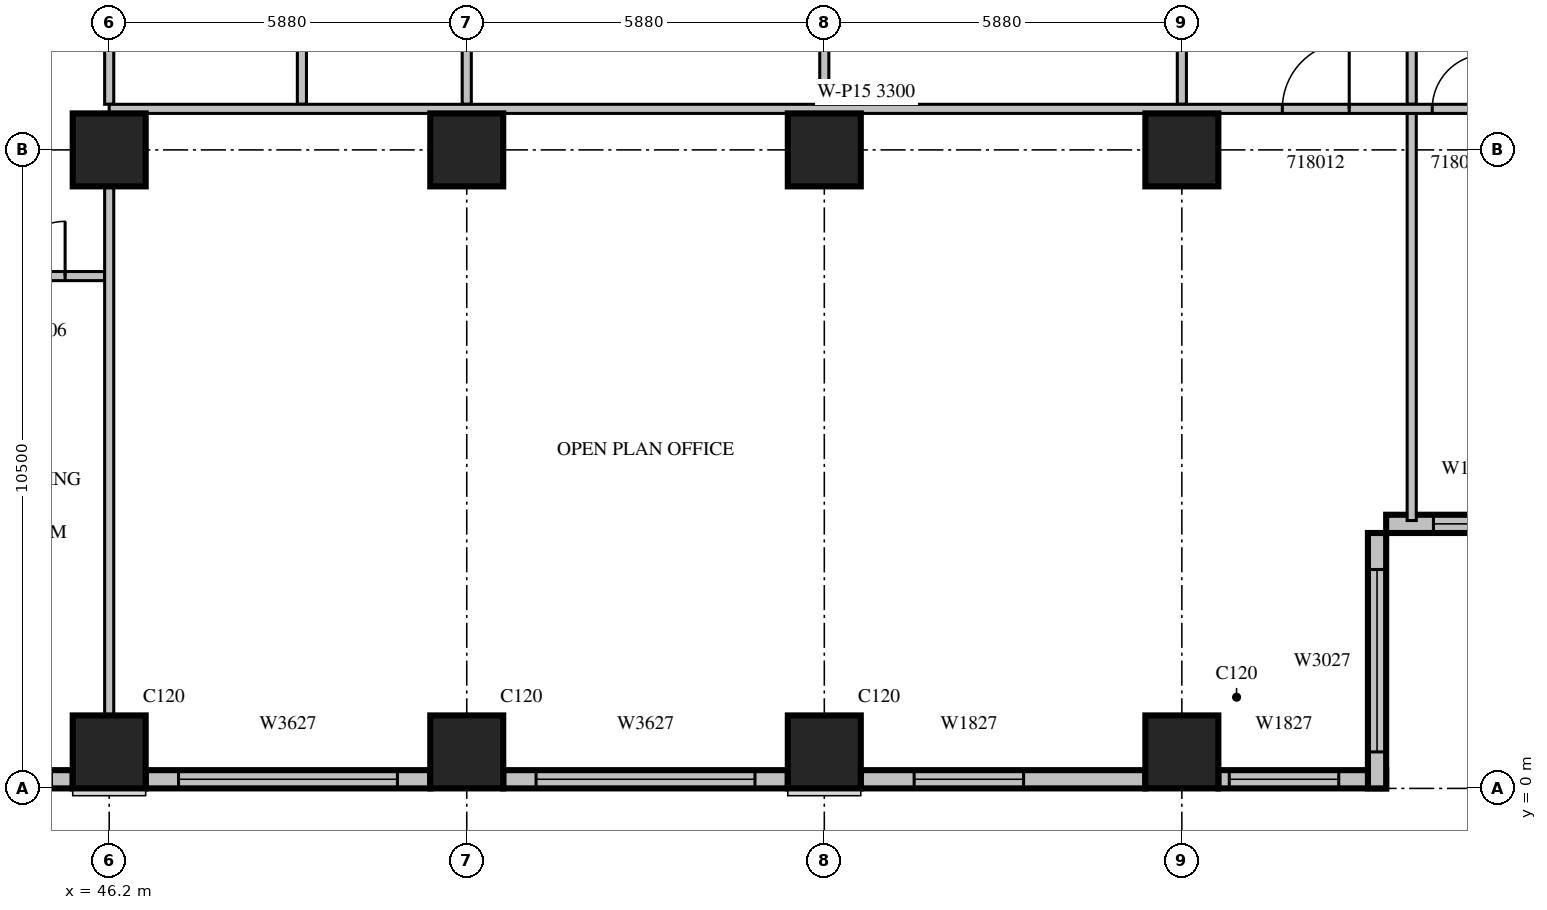
"""IFC4 building model, lengths in metres.
Left out: names, types, materials, properties, quantities, classifications, styles, units other than length and angle.
Written with IfcOpenShell. Run it as: python <this file> out.ifc"""

import sys

from ifc_helpers import new_model, si_unit, direction, frame, frame_2d, origin, origin_2d, place, context, subcontext, project, spatial, rectangle, extrude, source, transform, mapped, element, fill, save


model = new_model("IFC4")
c1 = context("Model", 3, precision=1e-05, world=origin(), true_north=direction((0.0, 1.0)))
c2 = subcontext(c1, "Body", "Model", "MODEL_VIEW")
j1 = project(units=[si_unit("LENGTHUNIT", "METRE"), si_unit("PLANEANGLEUNIT", "RADIAN")], contexts=[c1])
p1 = place(None, origin())
s1 = spatial("IfcSite", under=j1, at=p1, CompositionType="ELEMENT")
p2 = place(p1, origin())
s2 = spatial("IfcBuilding", under=s1, at=p2, CompositionType="ELEMENT")
p3 = place(p2, frame((0.0, 0.0, 86.7)))
s3 = spatial("IfcBuildingStorey", under=s2, at=p3, CompositionType="ELEMENT", Elevation=86.7)
m1 = source(origin(), c2, "Body", "SweptSolid", [
    extrude(rectangle(XDim=1.2, YDim=1.2, at=origin_2d()), origin(), (0.0, 0.0, 1.0), 4.2),
])
for number, where, z_axis, x_axis in (
    (1, (46.2, 0.6, 0.0), (0.0, 0.0, 1.0), (1.0, 0.0, 0.0)),
    (2, (52.08, 0.6, 0.0), (0.0, 0.0, 1.0), (1.0, 0.0, 0.0)),
    (3, (57.96, 0.6, 0.0), (0.0, 0.0, 1.0), (1.0, 0.0, 0.0)),
    (4, (63.84, 0.6, 0.0), (0.0, 0.0, 1.0), (1.0, 0.0, 0.0)),
    (5, (46.2, 10.5, 0.0), (0.0, 0.0, 1.0), (1.0, 0.0, 0.0)),
    (6, (52.08, 10.5, 0.0), (0.0, 0.0, 1.0), (1.0, 0.0, 0.0)),
    (7, (57.96, 10.5, 0.0), (0.0, 0.0, 1.0), (1.0, 0.0, 0.0)),
    (8, (63.84, 10.5, 0.0), (0.0, 0.0, 1.0), (1.0, 0.0, 0.0)),
):
    element("IfcColumn", number, at=place(p3, frame(where, z_axis=z_axis, x_axis=x_axis)), inside=s3, PredefinedType="COLUMN", context=c2, shape_type="MappedRepresentation", body=[
        mapped(m1, transform((0.0, 0.0, 0.0), scale=1.0)),
    ])
m2 = source(origin(), c2, "Body", "SweptSolid", [
    extrude(rectangle(XDim=1.6, YDim=0.3, at=frame_2d((0.8, 0.0))), origin(), (0.0, 0.0, 1.0), 3.8),
])
p4 = place(p3, frame((44.0, 0.15, 0.0), z_axis=(0.0, 0.0, 1.0), x_axis=(1.0, 0.0, 0.0)))
e9 = element("IfcWall", 9, at=p4, inside=s3, PredefinedType="STANDARD", context=c2, shape_type="MappedRepresentation", body=[
    mapped(m2, transform((0.0, 0.0, 0.0), scale=1.0)),
])
m3 = source(origin(), c2, "Body", "SweptSolid", [
    extrude(rectangle(XDim=0.9, YDim=2.7, at=frame_2d((0.45, 1.35))), frame((0.0, 0.16, 0.0), z_axis=(0.0, -1.0, 0.0), x_axis=(1.0, 0.0, 0.0)), (0.0, 0.0, 1.0), 0.32),
])
p5 = place(p4, frame((0.35, 0.0, 0.6)))
e10 = element("IfcOpeningElement", 10, at=p5, cuts=e9, PredefinedType="OPENING", context=c2, shape_type="MappedRepresentation", body=[
    mapped(m3, transform((0.0, 0.0, 0.0), scale=1.0)),
])
m4 = source(origin(), c2, "Body", "SweptSolid", [
    extrude(rectangle(XDim=4.68, YDim=0.3, at=frame_2d((2.34, 0.0))), origin(), (0.0, 0.0, 1.0), 3.8),
])
p6 = place(p3, frame((46.8, 0.15, 0.0), z_axis=(0.0, 0.0, 1.0), x_axis=(1.0, 0.0, 0.0)))
e11 = element("IfcWall", 11, at=p6, inside=s3, PredefinedType="STANDARD", context=c2, shape_type="MappedRepresentation", body=[
    mapped(m4, transform((0.0, 0.0, 0.0), scale=1.0)),
])
m5 = source(origin(), c2, "Body", "SweptSolid", [
    extrude(rectangle(XDim=3.6, YDim=2.7, at=frame_2d((1.8, 1.35))), frame((0.0, 0.16, 0.0), z_axis=(0.0, -1.0, 0.0), x_axis=(1.0, 0.0, 0.0)), (0.0, 0.0, 1.0), 0.32),
])
p7 = place(p6, frame((0.54, 0.0, 0.6)))
e12 = element("IfcOpeningElement", 12, at=p7, cuts=e11, PredefinedType="OPENING", context=c2, shape_type="MappedRepresentation", body=[
    mapped(m5, transform((0.0, 0.0, 0.0), scale=1.0)),
])
p8 = place(p3, frame((52.68, 0.15, 0.0), z_axis=(0.0, 0.0, 1.0), x_axis=(1.0, 0.0, 0.0)))
e13 = element("IfcWall", 13, at=p8, inside=s3, PredefinedType="STANDARD", context=c2, shape_type="MappedRepresentation", body=[
    mapped(m4, transform((0.0, 0.0, 0.0), scale=1.0)),
])
p9 = place(p8, frame((0.54, 0.0, 0.6)))
e14 = element("IfcOpeningElement", 14, at=p9, cuts=e13, PredefinedType="OPENING", context=c2, shape_type="MappedRepresentation", body=[
    mapped(m5, transform((0.0, 0.0, 0.0), scale=1.0)),
])
p10 = place(p3, frame((58.56, 0.15, 0.0), z_axis=(0.0, 0.0, 1.0), x_axis=(1.0, 0.0, 0.0)))
e15 = element("IfcWall", 15, at=p10, inside=s3, PredefinedType="STANDARD", context=c2, shape_type="MappedRepresentation", body=[
    mapped(m4, transform((0.0, 0.0, 0.0), scale=1.0)),
])
m6 = source(origin(), c2, "Body", "SweptSolid", [
    extrude(rectangle(XDim=1.8, YDim=2.7, at=frame_2d((0.9, 1.35))), frame((0.0, 0.16, 0.0), z_axis=(0.0, -1.0, 0.0), x_axis=(1.0, 0.0, 0.0)), (0.0, 0.0, 1.0), 0.32),
])
p11 = place(p10, frame((0.877, 0.0, 0.6)))
e16 = element("IfcOpeningElement", 16, at=p11, cuts=e15, PredefinedType="OPENING", context=c2, shape_type="MappedRepresentation", body=[
    mapped(m6, transform((0.0, 0.0, 0.0), scale=1.0)),
])
m7 = source(origin(), c2, "Body", "SweptSolid", [
    extrude(rectangle(XDim=2.76, YDim=0.3, at=frame_2d((1.38, 0.0))), origin(), (0.0, 0.0, 1.0), 3.8),
])
p12 = place(p3, frame((64.44, 0.15, 0.0), z_axis=(0.0, 0.0, 1.0), x_axis=(1.0, 0.0, 0.0)))
e17 = element("IfcWall", 17, at=p12, inside=s3, PredefinedType="STANDARD", context=c2, shape_type="MappedRepresentation", body=[
    mapped(m7, transform((0.0, 0.0, 0.0), scale=1.0)),
])
p13 = place(p12, frame((0.18, 0.0, 0.6)))
e18 = element("IfcOpeningElement", 18, at=p13, cuts=e17, PredefinedType="OPENING", context=c2, shape_type="MappedRepresentation", body=[
    mapped(m6, transform((0.0, 0.0, 0.0), scale=1.0)),
])
m8 = source(origin(), c2, "Body", "SweptSolid", [
    extrude(rectangle(XDim=4.2, YDim=0.3, at=frame_2d((2.1, 0.0))), origin(), (0.0, 0.0, 1.0), 3.8),
])
p14 = place(p3, frame((67.05, 0.0, 0.0), z_axis=(0.0, 0.0, 1.0), x_axis=(0.0, 1.0, 0.0)))
e19 = element("IfcWall", 19, at=p14, inside=s3, PredefinedType="STANDARD", context=c2, shape_type="MappedRepresentation", body=[
    mapped(m8, transform((0.0, 0.0, 0.0), scale=1.0)),
])
m9 = source(origin(), c2, "Body", "SweptSolid", [
    extrude(rectangle(XDim=3.0, YDim=2.7, at=frame_2d((1.5, 1.35))), frame((0.0, 0.16, 0.0), z_axis=(0.0, -1.0, 0.0), x_axis=(1.0, 0.0, 0.0)), (0.0, 0.0, 1.0), 0.32),
])
p15 = place(p14, frame((0.6, 0.0, 0.6)))
e20 = element("IfcOpeningElement", 20, at=p15, cuts=e19, PredefinedType="OPENING", context=c2, shape_type="MappedRepresentation", body=[
    mapped(m9, transform((0.0, 0.0, 0.0), scale=1.0)),
])
m10 = source(origin(), c2, "Body", "SweptSolid", [
    extrude(rectangle(XDim=2.52, YDim=0.3, at=frame_2d((1.26, 0.0))), origin(), (0.0, 0.0, 1.0), 3.8),
])
p16 = place(p3, frame((67.2, 4.35, 0.0), z_axis=(0.0, 0.0, 1.0), x_axis=(1.0, 0.0, 0.0)))
e21 = element("IfcWall", 21, at=p16, inside=s3, PredefinedType="STANDARD", context=c2, shape_type="MappedRepresentation", body=[
    mapped(m10, transform((0.0, 0.0, 0.0), scale=1.0)),
])
m11 = source(origin(), c2, "Body", "SweptSolid", [
    extrude(rectangle(XDim=1.2, YDim=2.7, at=frame_2d((0.6, 1.35))), frame((0.0, 0.16, 0.0), z_axis=(0.0, -1.0, 0.0), x_axis=(1.0, 0.0, 0.0)), (0.0, 0.0, 1.0), 0.32),
])
p17 = place(p16, frame((0.777, 0.0, 0.6)))
e22 = element("IfcOpeningElement", 22, at=p17, cuts=e21, PredefinedType="OPENING", context=c2, shape_type="MappedRepresentation", body=[
    mapped(m11, transform((0.0, 0.0, 0.0), scale=1.0)),
])
m12 = source(origin(), c2, "Body", "SweptSolid", [
    extrude(rectangle(XDim=2.2, YDim=0.15, at=frame_2d((1.1, 0.0))), origin(), (0.0, 0.0, 1.0), 3.8),
])
p18 = place(p3, frame((46.125, 8.425, 0.0), z_axis=(0.0, 0.0, 1.0), x_axis=(-1.0, 0.0, 0.0)))
e23 = element("IfcWall", 23, at=p18, inside=s3, PredefinedType="PARTITIONING", context=c2, shape_type="MappedRepresentation", body=[
    mapped(m12, transform((0.0, 0.0, 0.0), scale=1.0)),
])
m13 = source(origin(), c2, "Body", "SweptSolid", [
    extrude(rectangle(XDim=0.9, YDim=2.1, at=frame_2d((0.45, 1.05))), frame((0.0, 0.085, 0.0), z_axis=(0.0, -1.0, 0.0), x_axis=(1.0, 0.0, 0.0)), (0.0, 0.0, 1.0), 0.17),
])
p19 = place(p18, frame((0.65, 0.0, 0.0)))
e24 = element("IfcOpeningElement", 24, at=p19, cuts=e23, PredefinedType="OPENING", context=c2, shape_type="MappedRepresentation", body=[
    mapped(m13, transform((0.0, 0.0, 0.0), scale=1.0)),
])
m14 = source(origin(), c2, "Body", "SweptSolid", [
    extrude(rectangle(XDim=3.45, YDim=0.15, at=frame_2d((1.725, 0.0))), origin(), (0.0, 0.0, 1.0), 3.8),
])
for number, where, z_axis, x_axis in (
    (25, (49.369, 11.25, 0.0), (0.0, 0.0, 1.0), (0.0, 1.0, 0.0)),
    (26, (52.08, 11.25, 0.0), (0.0, 0.0, 1.0), (0.0, 1.0, 0.0)),
    (27, (57.96, 11.25, 0.0), (0.0, 0.0, 1.0), (0.0, 1.0, 0.0)),
    (28, (63.84, 11.25, 0.0), (0.0, 0.0, 1.0), (0.0, 1.0, 0.0)),
):
    element("IfcWall", number, at=place(p3, frame(where, z_axis=z_axis, x_axis=x_axis)), inside=s3, PredefinedType="PARTITIONING", context=c2, shape_type="MappedRepresentation", body=[
        mapped(m14, transform((0.0, 0.0, 0.0), scale=1.0)),
    ])
m15 = source(origin(), c2, "Body", "SweptSolid", [
    extrude(rectangle(XDim=8.702, YDim=0.15, at=frame_2d((4.351, 0.0))), origin(), (0.0, 0.0, 1.0), 3.8),
])
p20 = place(p3, frame((46.2, 1.199, 0.0), z_axis=(0.0, 0.0, 1.0), x_axis=(0.0, 1.0, 0.0)))
e29 = element("IfcWall", 29, at=p20, inside=s3, PredefinedType="PARTITIONING", context=c2, shape_type="MappedRepresentation", body=[
    mapped(m15, transform((0.0, 0.0, 0.0), scale=1.0)),
])
p21 = place(p3, frame((46.2, 11.25, 0.0), z_axis=(0.0, 0.0, 1.0), x_axis=(0.0, 1.0, 0.0)))
e30 = element("IfcWall", 30, at=p21, inside=s3, PredefinedType="PARTITIONING", context=c2, shape_type="MappedRepresentation", body=[
    mapped(m14, transform((0.0, 0.0, 0.0), scale=1.0)),
])
m16 = source(origin(), c2, "Body", "SweptSolid", [
    extrude(rectangle(XDim=6.695, YDim=0.15, at=frame_2d((3.348, 0.0))), origin(), (0.0, 0.0, 1.0), 3.8),
])
p22 = place(p3, frame((67.62, 4.405, 0.0), z_axis=(0.0, 0.0, 1.0), x_axis=(0.0, 1.0, 0.0)))
e31 = element("IfcWall", 31, at=p22, inside=s3, PredefinedType="PARTITIONING", context=c2, shape_type="MappedRepresentation", body=[
    mapped(m16, transform((0.0, 0.0, 0.0), scale=1.0)),
])
p23 = place(p3, frame((67.62, 11.25, 0.0), z_axis=(0.0, 0.0, 1.0), x_axis=(0.0, 1.0, 0.0)))
e32 = element("IfcWall", 32, at=p23, inside=s3, PredefinedType="PARTITIONING", context=c2, shape_type="MappedRepresentation", body=[
    mapped(m14, transform((0.0, 0.0, 0.0), scale=1.0)),
])
m17 = source(origin(), c2, "Body", "SweptSolid", [
    extrude(rectangle(XDim=24.9, YDim=0.15, at=frame_2d((12.45, 0.0))), origin(), (0.0, 0.0, 1.0), 3.3),
])
p24 = place(p3, frame((71.1, 11.175, 0.0), z_axis=(0.0, 0.0, 1.0), x_axis=(-1.0, 0.0, 0.0)))
e33 = element("IfcWall", 33, at=p24, inside=s3, PredefinedType="PARTITIONING", context=c2, shape_type="MappedRepresentation", body=[
    mapped(m17, transform((0.0, 0.0, 0.0), scale=1.0)),
])
m18 = source(origin(), c2, "Body", "SweptSolid", [
    extrude(rectangle(XDim=1.1, YDim=2.1, at=frame_2d((0.55, 1.05))), frame((0.0, 0.085, 0.0), z_axis=(0.0, -1.0, 0.0), x_axis=(1.0, 0.0, 0.0)), (0.0, 0.0, 1.0), 0.17),
])
p25 = place(p24, frame((4.508, 0.0, 0.0)))
e34 = element("IfcOpeningElement", 34, at=p25, cuts=e33, PredefinedType="OPENING", context=c2, shape_type="MappedRepresentation", body=[
    mapped(m18, transform((0.0, 0.0, 0.0), scale=1.0)),
])
p26 = place(p24, frame((2.243, 0.0, 0.0)))
e35 = element("IfcOpeningElement", 35, at=p26, cuts=e33, PredefinedType="OPENING", context=c2, shape_type="MappedRepresentation", body=[
    mapped(m13, transform((0.0, 0.0, 0.0), scale=1.0)),
])
m19 = source(origin(), c2, "Body", "SweptSolid", [
    extrude(rectangle(XDim=3.6, YDim=2.7, at=frame_2d((1.8, 1.35))), frame((0.0, 0.03, 0.0), z_axis=(0.0, -1.0, 0.0), x_axis=(1.0, 0.0, 0.0)), (0.0, 0.0, 1.0), 0.06),
])
p27 = place(p7, origin())
e36 = element("IfcWindow", 36, at=p27, inside=s3, PartitioningType="SINGLE_PANEL", PredefinedType="WINDOW", context=c2, shape_type="MappedRepresentation", body=[
    mapped(m19, transform((0.0, 0.0, 0.0), scale=1.0)),
])
fill(e12, e36)
p28 = place(p9, origin())
e37 = element("IfcWindow", 37, at=p28, inside=s3, PartitioningType="SINGLE_PANEL", PredefinedType="WINDOW", context=c2, shape_type="MappedRepresentation", body=[
    mapped(m19, transform((0.0, 0.0, 0.0), scale=1.0)),
])
fill(e14, e37)
m20 = source(origin(), c2, "Body", "SweptSolid", [
    extrude(rectangle(XDim=1.8, YDim=2.7, at=frame_2d((0.9, 1.35))), frame((0.0, 0.03, 0.0), z_axis=(0.0, -1.0, 0.0), x_axis=(1.0, 0.0, 0.0)), (0.0, 0.0, 1.0), 0.06),
])
p29 = place(p11, origin())
e38 = element("IfcWindow", 38, at=p29, inside=s3, PartitioningType="SINGLE_PANEL", PredefinedType="WINDOW", context=c2, shape_type="MappedRepresentation", body=[
    mapped(m20, transform((0.0, 0.0, 0.0), scale=1.0)),
])
fill(e16, e38)
p30 = place(p13, origin())
e39 = element("IfcWindow", 39, at=p30, inside=s3, PartitioningType="SINGLE_PANEL", PredefinedType="WINDOW", context=c2, shape_type="MappedRepresentation", body=[
    mapped(m20, transform((0.0, 0.0, 0.0), scale=1.0)),
])
fill(e18, e39)
m21 = source(origin(), c2, "Body", "SweptSolid", [
    extrude(rectangle(XDim=3.0, YDim=2.7, at=frame_2d((1.5, 1.35))), frame((0.0, 0.03, 0.0), z_axis=(0.0, -1.0, 0.0), x_axis=(1.0, 0.0, 0.0)), (0.0, 0.0, 1.0), 0.06),
])
p31 = place(p15, origin())
e40 = element("IfcWindow", 40, at=p31, inside=s3, PartitioningType="SINGLE_PANEL", PredefinedType="WINDOW", context=c2, shape_type="MappedRepresentation", body=[
    mapped(m21, transform((0.0, 0.0, 0.0), scale=1.0)),
])
fill(e20, e40)
m22 = source(origin(), c2, "Body", "SweptSolid", [
    extrude(rectangle(XDim=1.2, YDim=2.7, at=frame_2d((0.6, 1.35))), frame((0.0, 0.03, 0.0), z_axis=(0.0, -1.0, 0.0), x_axis=(1.0, 0.0, 0.0)), (0.0, 0.0, 1.0), 0.06),
])
p32 = place(p17, origin())
e41 = element("IfcWindow", 41, at=p32, inside=s3, PartitioningType="SINGLE_PANEL", PredefinedType="WINDOW", context=c2, shape_type="MappedRepresentation", body=[
    mapped(m22, transform((0.0, 0.0, 0.0), scale=1.0)),
])
fill(e22, e41)
m23 = source(origin(), c2, "Body", "SweptSolid", [
    extrude(rectangle(XDim=0.9, YDim=2.1, at=frame_2d((0.45, 1.05))), frame((0.0, 0.025, 0.0), z_axis=(0.0, -1.0, 0.0), x_axis=(1.0, 0.0, 0.0)), (0.0, 0.0, 1.0), 0.05),
])
p33 = place(p19, origin())
e42 = element("IfcDoor", 42, at=p33, inside=s3, OperationType="SINGLE_SWING_RIGHT", PredefinedType="DOOR", context=c2, shape_type="MappedRepresentation", body=[
    mapped(m23, transform((0.0, 0.0, 0.0), scale=1.0)),
])
fill(e24, e42)
m24 = source(origin(), c2, "Body", "SweptSolid", [
    extrude(rectangle(XDim=1.1, YDim=2.1, at=frame_2d((0.55, 1.05))), frame((0.0, 0.025, 0.0), z_axis=(0.0, -1.0, 0.0), x_axis=(1.0, 0.0, 0.0)), (0.0, 0.0, 1.0), 0.05),
])
p34 = place(p25, origin())
e43 = element("IfcDoor", 43, at=p34, inside=s3, OperationType="SINGLE_SWING_RIGHT", PredefinedType="DOOR", context=c2, shape_type="MappedRepresentation", body=[
    mapped(m24, transform((0.0, 0.0, 0.0), scale=1.0)),
])
fill(e34, e43)
p35 = place(p26, origin())
e44 = element("IfcDoor", 44, at=p35, inside=s3, OperationType="SINGLE_SWING_RIGHT", PredefinedType="DOOR", context=c2, shape_type="MappedRepresentation", body=[
    mapped(m23, transform((0.0, 0.0, 0.0), scale=1.0)),
])
fill(e35, e44)
save(model, sys.argv[1])
